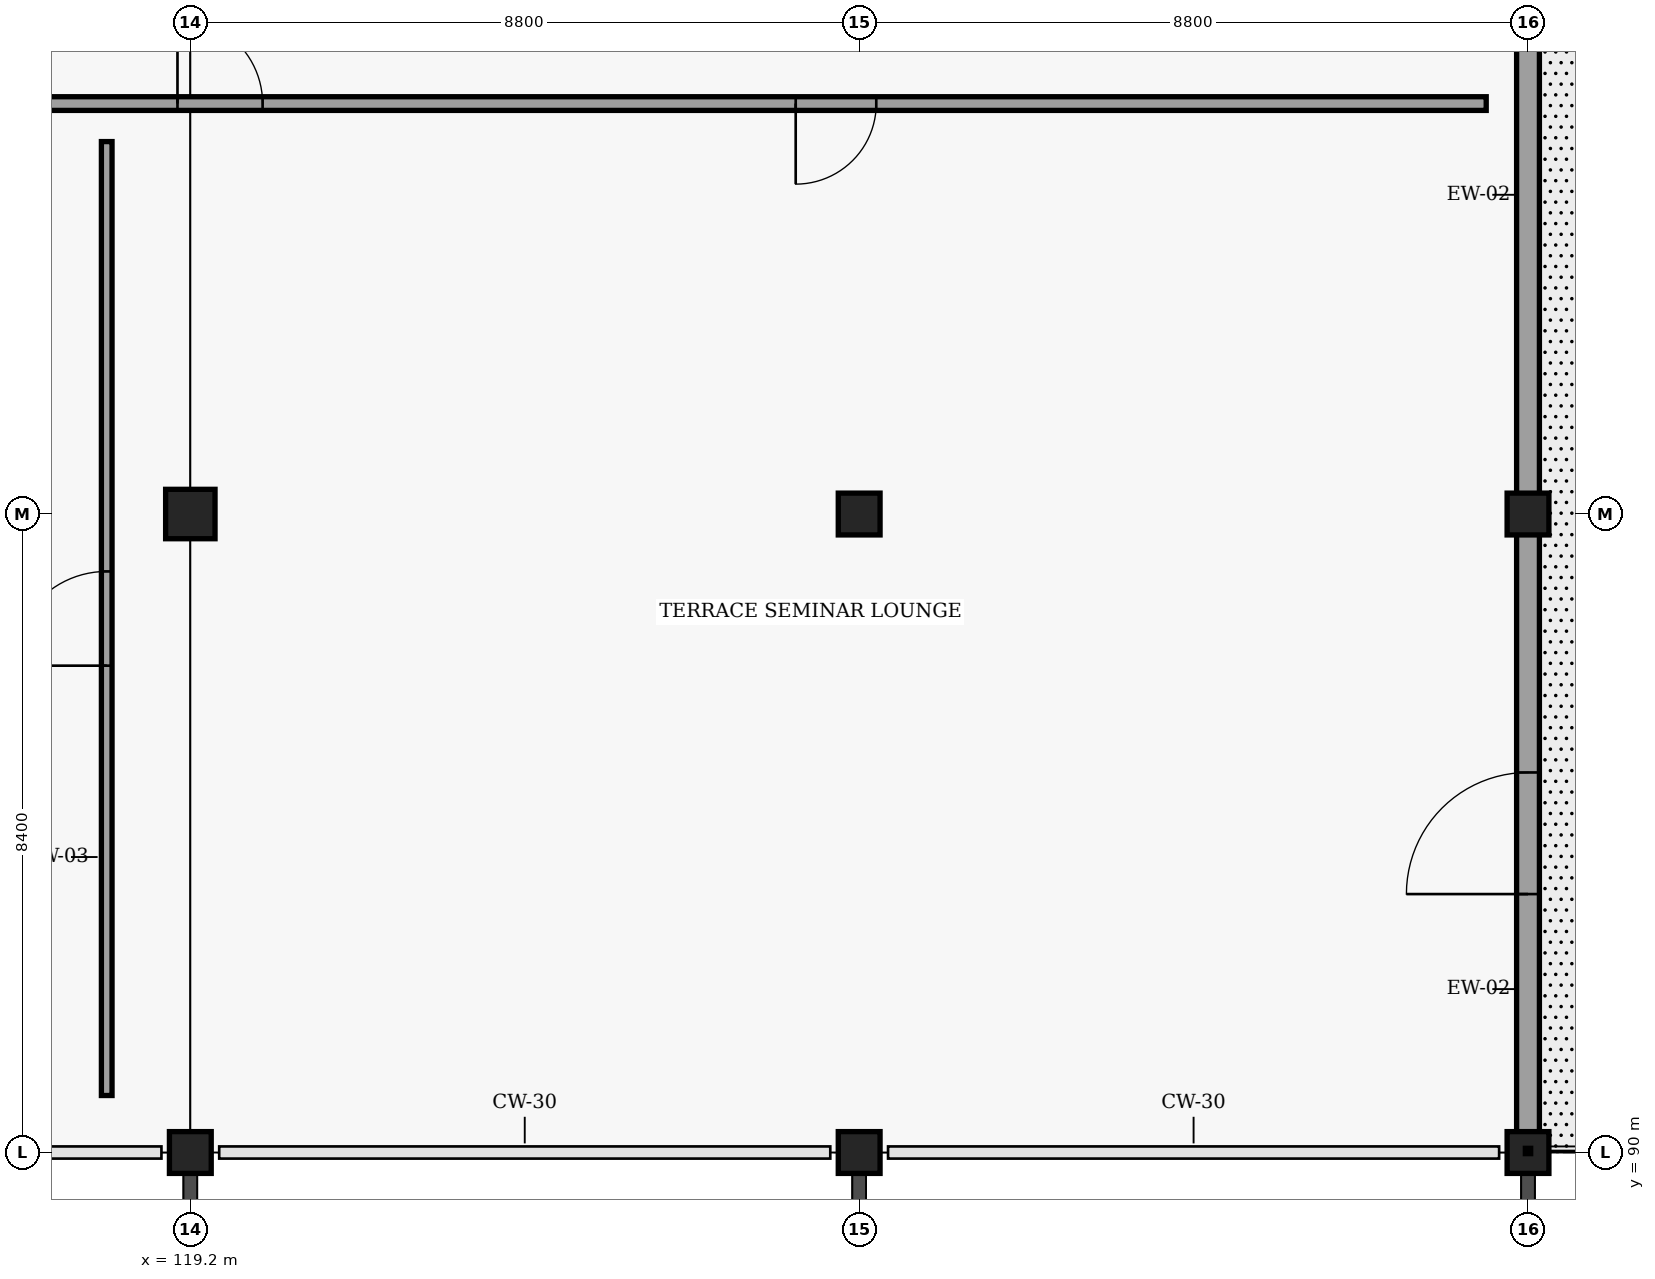
"""IFC4 building model, lengths in metres.
Left out: names, types, materials, properties, quantities, classifications, styles, units other than length and angle.
Written with IfcOpenShell. Run it as: python <this file> out.ifc"""

import sys

from ifc_helpers import new_model, si_unit, direction, frame, frame_2d, origin, origin_2d, place, context, subcontext, project, spatial, rectangle, extrude, element, fill, save


model = new_model("IFC4")
c1 = context("Model", 3, precision=1e-05, world=origin(), true_north=direction((0.0, 1.0)))
c2 = subcontext(c1, "Body", "Model", "MODEL_VIEW")
j1 = project(units=[si_unit("LENGTHUNIT", "METRE"), si_unit("PLANEANGLEUNIT", "RADIAN")], contexts=[c1])
p1 = place(None, origin())
s1 = spatial("IfcSite", under=j1, at=p1, CompositionType="ELEMENT")
p2 = place(p1, origin())
s2 = spatial("IfcBuilding", under=s1, at=p2, CompositionType="ELEMENT")
p3 = place(p2, frame((0.0, 0.0, 9.0)))
s3 = spatial("IfcBuildingStorey", under=s2, at=p3, CompositionType="ELEMENT", Elevation=9.0)
p4 = place(p3, frame((119.2, 90.0, 0.0), z_axis=(0.0, 0.0, 1.0), x_axis=(1.0, 0.0, 0.0)))
e1 = element("IfcColumn", 1, at=p4, inside=s3, PredefinedType="COLUMN", context=c2, shape_type="SweptSolid", body=[
    extrude(rectangle(XDim=0.55, YDim=0.55, at=origin_2d()), origin(), (0.0, 0.0, 1.0), 3.9),
])
p5 = place(p3, frame((119.2, 98.4, 0.0), z_axis=(0.0, 0.0, 1.0), x_axis=(1.0, 0.0, 0.0)))
e2 = element("IfcColumn", 2, at=p5, inside=s3, PredefinedType="COLUMN", context=c2, shape_type="SweptSolid", body=[
    extrude(rectangle(XDim=0.65, YDim=0.65, at=origin_2d()), origin(), (0.0, 0.0, 1.0), 3.9),
])
for number, where, z_axis, x_axis in (
    (3, (128.0, 90.0, 0.0), (0.0, 0.0, 1.0), (1.0, 0.0, 0.0)),
    (4, (128.0, 98.4, 0.0), (0.0, 0.0, 1.0), (1.0, 0.0, 0.0)),
    (5, (136.8, 90.0, 0.0), (0.0, 0.0, 1.0), (1.0, 0.0, 0.0)),
    (6, (136.8, 98.4, 0.0), (0.0, 0.0, 1.0), (1.0, 0.0, 0.0)),
):
    element("IfcColumn", number, at=place(p3, frame(where, z_axis=z_axis, x_axis=x_axis)), inside=s3, PredefinedType="COLUMN", context=c2, shape_type="SweptSolid", body=[
        extrude(rectangle(XDim=0.55, YDim=0.55, at=origin_2d()), origin(), (0.0, 0.0, 1.0), 3.9),
    ])
p6 = place(p3, frame((136.8, 90.1, 0.0), z_axis=(0.0, 0.0, 1.0), x_axis=(0.0, 1.0, 0.0)))
e7 = element("IfcWall", 7, at=p6, inside=s3, PredefinedType="SOLIDWALL", context=c2, shape_type="SweptSolid", body=[
    extrude(rectangle(XDim=8.2, YDim=0.3, at=frame_2d((4.1, 0.0))), origin(), (0.0, 0.0, 1.0), 3.195),
])
p7 = place(p6, frame((3.3, 0.0, 0.0)))
e8 = element("IfcOpeningElement", 8, at=p7, cuts=e7, PredefinedType="OPENING", context=c2, shape_type="SweptSolid", body=[
    extrude(rectangle(XDim=1.6, YDim=2.2, at=frame_2d((0.8, 1.1))), frame((0.0, 0.16, 0.0), z_axis=(0.0, -1.0, 0.0), x_axis=(1.0, 0.0, 0.0)), (0.0, 0.0, 1.0), 0.32),
])
p8 = place(p3, frame((136.8, 98.5, 0.0), z_axis=(0.0, 0.0, 1.0), x_axis=(0.0, 1.0, 0.0)))
e9 = element("IfcWall", 9, at=p8, inside=s3, PredefinedType="SOLIDWALL", context=c2, shape_type="SweptSolid", body=[
    extrude(rectangle(XDim=8.2, YDim=0.3, at=frame_2d((4.1, 0.0))), origin(), (0.0, 0.0, 1.0), 3.195),
])
p9 = place(p3, frame((42.15, 103.8, 0.0), z_axis=(0.0, 0.0, 1.0), x_axis=(1.0, 0.0, 0.0)))
e10 = element("IfcWall", 10, at=p9, inside=s3, PredefinedType="PARTITIONING", context=c2, shape_type="SweptSolid", body=[
    extrude(rectangle(XDim=94.1, YDim=0.18, at=frame_2d((47.05, 0.0))), origin(), (0.0, 0.0, 1.0), 2.895),
])
p10 = place(p9, frame((7.905, 0.0, 0.0)))
e11 = element("IfcOpeningElement", 11, at=p10, cuts=e10, PredefinedType="OPENING", context=c2, shape_type="SweptSolid", body=[
    extrude(rectangle(XDim=1.3, YDim=2.2, at=frame_2d((0.65, 1.1))), frame((0.0, 0.1, 0.0), z_axis=(0.0, -1.0, 0.0), x_axis=(1.0, 0.0, 0.0)), (0.0, 0.0, 1.0), 0.2),
])
p11 = place(p9, frame((15.459, 0.0, 0.0)))
e12 = element("IfcOpeningElement", 12, at=p11, cuts=e10, PredefinedType="OPENING", context=c2, shape_type="SweptSolid", body=[
    extrude(rectangle(XDim=1.5, YDim=2.25, at=frame_2d((0.75, 1.125))), frame((0.0, 0.1, 0.0), z_axis=(0.0, -1.0, 0.0), x_axis=(1.0, 0.0, 0.0)), (0.0, 0.0, 1.0), 0.2),
])
p12 = place(p9, frame((25.044, 0.0, 0.0)))
e13 = element("IfcOpeningElement", 13, at=p12, cuts=e10, PredefinedType="OPENING", context=c2, shape_type="SweptSolid", body=[
    extrude(rectangle(XDim=1.24, YDim=2.2, at=frame_2d((0.62, 1.1))), frame((0.0, 0.1, 0.0), z_axis=(0.0, -1.0, 0.0), x_axis=(1.0, 0.0, 0.0)), (0.0, 0.0, 1.0), 0.2),
])
p13 = place(p9, frame((33.538, 0.0, 0.0)))
e14 = element("IfcOpeningElement", 14, at=p13, cuts=e10, PredefinedType="OPENING", context=c2, shape_type="SweptSolid", body=[
    extrude(rectangle(XDim=1.36, YDim=2.22, at=frame_2d((0.68, 1.11))), frame((0.0, 0.1, 0.0), z_axis=(0.0, -1.0, 0.0), x_axis=(1.0, 0.0, 0.0)), (0.0, 0.0, 1.0), 0.2),
])
p14 = place(p9, frame((41.933, 0.0, 0.0)))
e15 = element("IfcOpeningElement", 15, at=p14, cuts=e10, PredefinedType="OPENING", context=c2, shape_type="SweptSolid", body=[
    extrude(rectangle(XDim=1.68, YDim=2.26, at=frame_2d((0.84, 1.13))), frame((0.0, 0.1, 0.0), z_axis=(0.0, -1.0, 0.0), x_axis=(1.0, 0.0, 0.0)), (0.0, 0.0, 1.0), 0.2),
])
p15 = place(p9, frame((50.807, 0.0, 0.0)))
e16 = element("IfcOpeningElement", 16, at=p15, cuts=e10, PredefinedType="OPENING", context=c2, shape_type="SweptSolid", body=[
    extrude(rectangle(XDim=1.04, YDim=2.08, at=frame_2d((0.52, 1.04))), frame((0.0, 0.1, 0.0), z_axis=(0.0, -1.0, 0.0), x_axis=(1.0, 0.0, 0.0)), (0.0, 0.0, 1.0), 0.2),
])
p16 = place(p9, frame((58.882, 0.0, 0.0)))
e17 = element("IfcOpeningElement", 17, at=p16, cuts=e10, PredefinedType="OPENING", context=c2, shape_type="SweptSolid", body=[
    extrude(rectangle(XDim=2.0, YDim=2.3, at=frame_2d((1.0, 1.15))), frame((0.0, 0.1, 0.0), z_axis=(0.0, -1.0, 0.0), x_axis=(1.0, 0.0, 0.0)), (0.0, 0.0, 1.0), 0.2),
])
p17 = place(p9, frame((67.511, 0.0, 0.0)))
e18 = element("IfcOpeningElement", 18, at=p17, cuts=e10, PredefinedType="OPENING", context=c2, shape_type="SweptSolid", body=[
    extrude(rectangle(XDim=1.85, YDim=2.22, at=frame_2d((0.925, 1.11))), frame((0.0, 0.1, 0.0), z_axis=(0.0, -1.0, 0.0), x_axis=(1.0, 0.0, 0.0)), (0.0, 0.0, 1.0), 0.2),
])
p18 = place(p9, frame((76.881, 0.0, 0.0)))
e19 = element("IfcOpeningElement", 19, at=p18, cuts=e10, PredefinedType="OPENING", context=c2, shape_type="SweptSolid", body=[
    extrude(rectangle(XDim=1.12, YDim=2.16, at=frame_2d((0.56, 1.08))), frame((0.0, 0.1, 0.0), z_axis=(0.0, -1.0, 0.0), x_axis=(1.0, 0.0, 0.0)), (0.0, 0.0, 1.0), 0.2),
])
p19 = place(p9, frame((85.015, 0.0, 0.0)))
e20 = element("IfcOpeningElement", 20, at=p19, cuts=e10, PredefinedType="OPENING", context=c2, shape_type="SweptSolid", body=[
    extrude(rectangle(XDim=1.06, YDim=2.16, at=frame_2d((0.53, 1.08))), frame((0.0, 0.1, 0.0), z_axis=(0.0, -1.0, 0.0), x_axis=(1.0, 0.0, 0.0)), (0.0, 0.0, 1.0), 0.2),
])
p20 = place(p3, frame((118.1, 90.75, 0.0), z_axis=(0.0, 0.0, 1.0), x_axis=(0.0, 1.0, 0.0)))
e21 = element("IfcWall", 21, at=p20, inside=s3, PredefinedType="PARTITIONING", context=c2, shape_type="SweptSolid", body=[
    extrude(rectangle(XDim=12.55, YDim=0.14, at=frame_2d((6.275, 0.0))), origin(), (0.0, 0.0, 1.0), 2.845),
])
p21 = place(p20, frame((5.655, 0.0, 0.0)))
e22 = element("IfcOpeningElement", 22, at=p21, cuts=e21, PredefinedType="OPENING", context=c2, shape_type="SweptSolid", body=[
    extrude(rectangle(XDim=1.24, YDim=2.2, at=frame_2d((0.62, 1.1))), frame((0.0, 0.08, 0.0), z_axis=(0.0, -1.0, 0.0), x_axis=(1.0, 0.0, 0.0)), (0.0, 0.0, 1.0), 0.16),
])
p22 = place(p7, origin())
e23 = element("IfcDoor", 23, at=p22, inside=s3, OperationType="DOUBLE_DOOR_SINGLE_SWING", PredefinedType="DOOR", context=c2, shape_type="SweptSolid", body=[
    extrude(rectangle(XDim=1.6, YDim=2.2, at=frame_2d((0.8, 1.1))), frame((0.0, 0.025, 0.0), z_axis=(0.0, -1.0, 0.0), x_axis=(1.0, 0.0, 0.0)), (0.0, 0.0, 1.0), 0.05),
])
fill(e8, e23)
p23 = place(p18, origin())
e24 = element("IfcDoor", 24, at=p23, inside=s3, OperationType="SINGLE_SWING_LEFT", PredefinedType="DOOR", context=c2, shape_type="SweptSolid", body=[
    extrude(rectangle(XDim=1.12, YDim=2.16, at=frame_2d((0.56, 1.08))), frame((0.0, 0.025, 0.0), z_axis=(0.0, -1.0, 0.0), x_axis=(1.0, 0.0, 0.0)), (0.0, 0.0, 1.0), 0.05),
])
fill(e19, e24)
p24 = place(p19, origin())
e25 = element("IfcDoor", 25, at=p24, inside=s3, OperationType="SINGLE_SWING_RIGHT", PredefinedType="DOOR", context=c2, shape_type="SweptSolid", body=[
    extrude(rectangle(XDim=1.06, YDim=2.16, at=frame_2d((0.53, 1.08))), frame((0.0, 0.025, 0.0), z_axis=(0.0, -1.0, 0.0), x_axis=(1.0, 0.0, 0.0)), (0.0, 0.0, 1.0), 0.05),
])
fill(e20, e25)
p25 = place(p21, origin())
e26 = element("IfcDoor", 26, at=p25, inside=s3, OperationType="SINGLE_SWING_LEFT", PredefinedType="DOOR", context=c2, shape_type="SweptSolid", body=[
    extrude(rectangle(XDim=1.24, YDim=2.2, at=frame_2d((0.62, 1.1))), frame((0.0, 0.025, 0.0), z_axis=(0.0, -1.0, 0.0), x_axis=(1.0, 0.0, 0.0)), (0.0, 0.0, 1.0), 0.05),
])
fill(e22, e26)
save(model, sys.argv[1])
